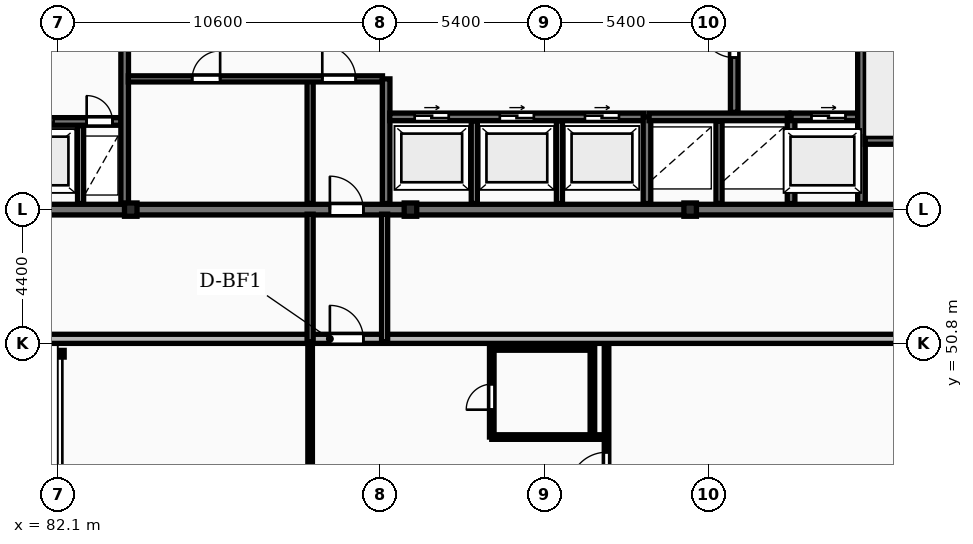
"""IFC4 building model, lengths in metres.
Left out: names, types, materials, properties, quantities, classifications, styles, units other than length and angle.
Written with IfcOpenShell. Run it as: python <this file> out.ifc"""

import sys

from ifc_helpers import new_model, si_unit, direction, frame, frame_2d, origin, origin_2d, place, context, subcontext, project, spatial, rectangle, i_section, extrude, element, fill, save


model = new_model("IFC4")
c1 = context("Model", 3, precision=1e-05, world=origin(), true_north=direction((0.0, 1.0)))
c2 = subcontext(c1, "Body", "Model", "MODEL_VIEW")
j1 = project(units=[si_unit("LENGTHUNIT", "METRE"), si_unit("PLANEANGLEUNIT", "RADIAN")], contexts=[c1])
p1 = place(None, origin())
s1 = spatial("IfcSite", under=j1, at=p1, CompositionType="ELEMENT")
p2 = place(p1, origin())
s2 = spatial("IfcBuilding", under=s1, at=p2, CompositionType="ELEMENT")
p3 = place(p2, frame((0.0, 0.0, 142.9)))
s3 = spatial("IfcBuildingStorey", under=s2, at=p3, CompositionType="ELEMENT", Elevation=142.9)
for number, where, z_axis, x_axis in (
    (1, (84.5, 55.2, 0.0), (0.0, 0.0, 1.0), (1.0, 0.0, 0.0)),
    (2, (93.7, 55.2, 0.0), (0.0, 0.0, 1.0), (1.0, 0.0, 0.0)),
    (3, (102.9, 55.2, 0.0), (0.0, 0.0, 1.0), (1.0, 0.0, 0.0)),
):
    element("IfcColumn", number, at=place(p3, frame(where, z_axis=z_axis, x_axis=x_axis)), inside=s3, PredefinedType="COLUMN", context=c2, shape_type="SweptSolid", body=[
        extrude(i_section(OverallWidth=0.412, OverallDepth=0.437, WebThickness=0.036, FlangeThickness=0.052, FilletRadius=0.015, at=origin_2d()), origin(), (0.0, 0.0, 1.0), 3.6),
    ])
p4 = place(p3, frame((57.6, 50.95, 0.0), z_axis=(0.0, 0.0, 1.0), x_axis=(1.0, 0.0, 0.0)))
e4 = element("IfcWall", 4, at=p4, inside=s3, PredefinedType="STANDARD", context=c2, shape_type="SweptSolid", body=[
    extrude(rectangle(XDim=73.0, YDim=0.3, at=frame_2d((36.5, 0.0))), origin(), (0.0, 0.0, 1.0), 3.31),
])
p5 = place(p4, frame((15.225, 0.0, 0.85)))
e5 = element("IfcOpeningElement", 5, at=p5, cuts=e4, PredefinedType="OPENING", context=c2, shape_type="SweptSolid", body=[
    extrude(rectangle(XDim=1.8, YDim=1.8, at=frame_2d((0.9, 0.9))), frame((0.0, 0.16, 0.0), z_axis=(0.0, -1.0, 0.0), x_axis=(1.0, 0.0, 0.0)), (0.0, 0.0, 1.0), 0.32),
])
p6 = place(p4, frame((58.575, 0.0, 0.85)))
e6 = element("IfcOpeningElement", 6, at=p6, cuts=e4, PredefinedType="OPENING", context=c2, shape_type="SweptSolid", body=[
    extrude(rectangle(XDim=1.8, YDim=1.8, at=frame_2d((0.9, 0.9))), frame((0.0, 0.16, 0.0), z_axis=(0.0, -1.0, 0.0), x_axis=(1.0, 0.0, 0.0)), (0.0, 0.0, 1.0), 0.32),
])
p7 = place(p4, frame((33.45, 0.0, 0.0)))
e7 = element("IfcOpeningElement", 7, at=p7, cuts=e4, PredefinedType="OPENING", context=c2, shape_type="SweptSolid", body=[
    extrude(rectangle(XDim=1.1, YDim=2.1, at=frame_2d((0.55, 1.05))), frame((0.0, 0.16, 0.0), z_axis=(0.0, -1.0, 0.0), x_axis=(1.0, 0.0, 0.0)), (0.0, 0.0, 1.0), 0.32),
])
p8 = place(p3, frame((75.95, 55.2, 0.0), z_axis=(0.0, 0.0, 1.0), x_axis=(1.0, 0.0, 0.0)))
e8 = element("IfcWall", 8, at=p8, inside=s3, PredefinedType="SHEAR", context=c2, shape_type="SweptSolid", body=[
    extrude(rectangle(XDim=36.3, YDim=0.35, at=frame_2d((18.15, 0.0))), origin(), (0.0, 0.0, 1.0), 3.6),
])
p9 = place(p8, frame((15.1, 0.0, 0.0)))
e9 = element("IfcOpeningElement", 9, at=p9, cuts=e8, PredefinedType="OPENING", context=c2, shape_type="SweptSolid", body=[
    extrude(rectangle(XDim=1.1, YDim=2.1, at=frame_2d((0.55, 1.05))), frame((0.0, 0.185, 0.0), z_axis=(0.0, -1.0, 0.0), x_axis=(1.0, 0.0, 0.0)), (0.0, 0.0, 1.0), 0.37),
])
p10 = place(p3, frame((79.79, 58.1, 0.0), z_axis=(0.0, 0.0, 1.0), x_axis=(1.0, 0.0, 0.0)))
e10 = element("IfcWall", 10, at=p10, inside=s3, PredefinedType="SHEAR", context=c2, shape_type="SweptSolid", body=[
    extrude(rectangle(XDim=4.39, YDim=0.25, at=frame_2d((2.195, 0.0))), origin(), (0.0, 0.0, 1.0), 3.6),
])
p11 = place(p10, frame((1.05, 0.0, 0.0)))
e11 = element("IfcOpeningElement", 11, at=p11, cuts=e10, PredefinedType="OPENING", context=c2, shape_type="SweptSolid", body=[
    extrude(rectangle(XDim=1.12, YDim=2.12, at=frame_2d((0.56, 1.06))), frame((0.0, 0.135, 0.0), z_axis=(0.0, -1.0, 0.0), x_axis=(1.0, 0.0, 0.0)), (0.0, 0.0, 1.0), 0.27),
])
p12 = place(p10, frame((3.26, 0.0, 0.0)))
e12 = element("IfcOpeningElement", 12, at=p12, cuts=e10, PredefinedType="OPENING", context=c2, shape_type="SweptSolid", body=[
    extrude(rectangle(XDim=0.85, YDim=2.05, at=frame_2d((0.425, 1.025))), frame((0.0, 0.135, 0.0), z_axis=(0.0, -1.0, 0.0), x_axis=(1.0, 0.0, 0.0)), (0.0, 0.0, 1.0), 0.27),
])
p13 = place(p3, frame((82.85, 55.4, 0.0), z_axis=(0.0, 0.0, 1.0), x_axis=(0.0, 1.0, 0.0)))
e13 = element("IfcWall", 13, at=p13, inside=s3, PredefinedType="PARTITIONING", context=c2, shape_type="SweptSolid", body=[
    extrude(rectangle(XDim=2.56, YDim=0.2, at=frame_2d((1.28, 0.0))), origin(), (0.0, 0.0, 1.0), 3.31),
])
p14 = place(p3, frame((84.3, 55.4, 0.0), z_axis=(0.0, 0.0, 1.0), x_axis=(0.0, 1.0, 0.0)))
e14 = element("IfcWall", 14, at=p14, inside=s3, PredefinedType="SHEAR", context=c2, shape_type="SweptSolid", body=[
    extrude(rectangle(XDim=11.6, YDim=0.25, at=frame_2d((5.8, 0.0))), origin(), (0.0, 0.0, 1.0), 3.6),
])
p15 = place(p14, frame((5.2, 0.0, 0.0)))
e15 = element("IfcOpeningElement", 15, at=p15, cuts=e14, PredefinedType="OPENING", context=c2, shape_type="SweptSolid", body=[
    extrude(rectangle(XDim=1.1, YDim=2.1, at=frame_2d((0.55, 1.05))), frame((0.0, 0.135, 0.0), z_axis=(0.0, -1.0, 0.0), x_axis=(1.0, 0.0, 0.0)), (0.0, 0.0, 1.0), 0.27),
])
p16 = place(p3, frame((90.4, 55.4, 0.0), z_axis=(0.0, 0.0, 1.0), x_axis=(0.0, 1.0, 0.0)))
e16 = element("IfcWall", 16, at=p16, inside=s3, PredefinedType="PARTITIONING", context=c2, shape_type="SweptSolid", body=[
    extrude(rectangle(XDim=4.1, YDim=0.2, at=frame_2d((2.05, 0.0))), origin(), (0.0, 0.0, 1.0), 3.31),
])
p17 = place(p3, frame((84.42, 59.5, 0.0), z_axis=(0.0, 0.0, 1.0), x_axis=(1.0, 0.0, 0.0)))
e17 = element("IfcWall", 17, at=p17, inside=s3, PredefinedType="PARTITIONING", context=c2, shape_type="SweptSolid", body=[
    extrude(rectangle(XDim=8.36, YDim=0.2, at=frame_2d((4.18, 0.0))), origin(), (0.0, 0.0, 1.0), 3.31),
])
p18 = place(p17, frame((2.1, 0.0, 0.0)))
e18 = element("IfcOpeningElement", 18, at=p18, cuts=e17, PredefinedType="OPENING", context=c2, shape_type="SweptSolid", body=[
    extrude(rectangle(XDim=0.92, YDim=2.08, at=frame_2d((0.46, 1.04))), frame((0.0, 0.11, 0.0), z_axis=(0.0, -1.0, 0.0), x_axis=(1.0, 0.0, 0.0)), (0.0, 0.0, 1.0), 0.22),
])
p19 = place(p17, frame((6.38, 0.0, 0.0)))
e19 = element("IfcOpeningElement", 19, at=p19, cuts=e17, PredefinedType="OPENING", context=c2, shape_type="SweptSolid", body=[
    extrude(rectangle(XDim=1.1, YDim=2.1, at=frame_2d((0.55, 1.05))), frame((0.0, 0.11, 0.0), z_axis=(0.0, -1.0, 0.0), x_axis=(1.0, 0.0, 0.0)), (0.0, 0.0, 1.0), 0.22),
])
p20 = place(p3, frame((92.9, 55.4, 0.0), z_axis=(0.0, 0.0, 1.0), x_axis=(0.0, 1.0, 0.0)))
e20 = element("IfcWall", 20, at=p20, inside=s3, PredefinedType="SHEAR", context=c2, shape_type="SweptSolid", body=[
    extrude(rectangle(XDim=4.1, YDim=0.25, at=frame_2d((2.05, 0.0))), origin(), (0.0, 0.0, 1.0), 3.6),
])
for number, where, z_axis, x_axis in (
    (21, (95.8, 55.4, 0.0), (0.0, 0.0, 1.0), (0.0, 1.0, 0.0)),
    (22, (98.6, 55.4, 0.0), (0.0, 0.0, 1.0), (0.0, 1.0, 0.0)),
):
    element("IfcWall", number, at=place(p3, frame(where, z_axis=z_axis, x_axis=x_axis)), inside=s3, PredefinedType="PARTITIONING", context=c2, shape_type="SweptSolid", body=[
        extrude(rectangle(XDim=2.72, YDim=0.2, at=frame_2d((1.36, 0.0))), origin(), (0.0, 0.0, 1.0), 3.31),
    ])
p21 = place(p3, frame((93.02, 58.25, 0.0), z_axis=(0.0, 0.0, 1.0), x_axis=(1.0, 0.0, 0.0)))
e23 = element("IfcWall", 23, at=p21, inside=s3, PredefinedType="SHEAR", context=c2, shape_type="SweptSolid", body=[
    extrude(rectangle(XDim=8.36, YDim=0.25, at=frame_2d((4.18, 0.0))), origin(), (0.0, 0.0, 1.0), 3.6),
])
p22 = place(p21, frame((0.82, 0.0, 0.0)))
e24 = element("IfcOpeningElement", 24, at=p22, cuts=e23, PredefinedType="OPENING", context=c2, shape_type="SweptSolid", body=[
    extrude(rectangle(XDim=1.12, YDim=2.12, at=frame_2d((0.56, 1.06))), frame((0.0, 0.135, 0.0), z_axis=(0.0, -1.0, 0.0), x_axis=(1.0, 0.0, 0.0)), (0.0, 0.0, 1.0), 0.27),
])
p23 = place(p21, frame((3.62, 0.0, 0.0)))
e25 = element("IfcOpeningElement", 25, at=p23, cuts=e23, PredefinedType="OPENING", context=c2, shape_type="SweptSolid", body=[
    extrude(rectangle(XDim=1.12, YDim=2.12, at=frame_2d((0.56, 1.06))), frame((0.0, 0.135, 0.0), z_axis=(0.0, -1.0, 0.0), x_axis=(1.0, 0.0, 0.0)), (0.0, 0.0, 1.0), 0.27),
])
p24 = place(p21, frame((6.42, 0.0, 0.0)))
e26 = element("IfcOpeningElement", 26, at=p24, cuts=e23, PredefinedType="OPENING", context=c2, shape_type="SweptSolid", body=[
    extrude(rectangle(XDim=1.12, YDim=2.12, at=frame_2d((0.56, 1.06))), frame((0.0, 0.135, 0.0), z_axis=(0.0, -1.0, 0.0), x_axis=(1.0, 0.0, 0.0)), (0.0, 0.0, 1.0), 0.27),
])
p25 = place(p3, frame((101.48, 55.4, 0.0), z_axis=(0.0, 0.0, 1.0), x_axis=(0.0, 1.0, 0.0)))
e27 = element("IfcWall", 27, at=p25, inside=s3, PredefinedType="SHEAR", context=c2, shape_type="SweptSolid", body=[
    extrude(rectangle(XDim=2.85, YDim=0.25, at=frame_2d((1.425, 0.0))), origin(), (0.0, 0.0, 1.0), 3.6),
])
p26 = place(p3, frame((103.85, 55.4, 0.0), z_axis=(0.0, 0.0, 1.0), x_axis=(0.0, 1.0, 0.0)))
e28 = element("IfcWall", 28, at=p26, inside=s3, PredefinedType="PARTITIONING", context=c2, shape_type="SweptSolid", body=[
    extrude(rectangle(XDim=2.72, YDim=0.2, at=frame_2d((1.36, 0.0))), origin(), (0.0, 0.0, 1.0), 3.31),
])
p27 = place(p3, frame((101.55, 58.25, 0.0), z_axis=(0.0, 0.0, 1.0), x_axis=(1.0, 0.0, 0.0)))
e29 = element("IfcWall", 29, at=p27, inside=s3, PredefinedType="SHEAR", context=c2, shape_type="SweptSolid", body=[
    extrude(rectangle(XDim=4.6, YDim=0.25, at=frame_2d((2.3, 0.0))), origin(), (0.0, 0.0, 1.0), 3.6),
])
p28 = place(p3, frame((106.22, 55.4, 0.0), z_axis=(0.0, 0.0, 1.0), x_axis=(0.0, 1.0, 0.0)))
e30 = element("IfcWall", 30, at=p28, inside=s3, PredefinedType="SHEAR", context=c2, shape_type="SweptSolid", body=[
    extrude(rectangle(XDim=2.85, YDim=0.25, at=frame_2d((1.425, 0.0))), origin(), (0.0, 0.0, 1.0), 3.6),
])
p29 = place(p3, frame((106.22, 58.25, 0.0), z_axis=(0.0, 0.0, 1.0), x_axis=(1.0, 0.0, 0.0)))
e31 = element("IfcWall", 31, at=p29, inside=s3, PredefinedType="SHEAR", context=c2, shape_type="SweptSolid", body=[
    extrude(rectangle(XDim=2.46, YDim=0.25, at=frame_2d((1.23, 0.0))), origin(), (0.0, 0.0, 1.0), 3.6),
])
p30 = place(p29, frame((0.67, 0.0, 0.0)))
e32 = element("IfcOpeningElement", 32, at=p30, cuts=e31, PredefinedType="OPENING", context=c2, shape_type="SweptSolid", body=[
    extrude(rectangle(XDim=1.12, YDim=2.12, at=frame_2d((0.56, 1.06))), frame((0.0, 0.135, 0.0), z_axis=(0.0, -1.0, 0.0), x_axis=(1.0, 0.0, 0.0)), (0.0, 0.0, 1.0), 0.27),
])
p31 = place(p3, frame((104.35, 58.4, 0.0), z_axis=(0.0, 0.0, 1.0), x_axis=(0.0, 1.0, 0.0)))
e33 = element("IfcWall", 33, at=p31, inside=s3, PredefinedType="SHEAR", context=c2, shape_type="SweptSolid", body=[
    extrude(rectangle(XDim=8.6, YDim=0.25, at=frame_2d((4.3, 0.0))), origin(), (0.0, 0.0, 1.0), 3.6),
])
p32 = place(p31, frame((1.8, 0.0, 0.0)))
e34 = element("IfcOpeningElement", 34, at=p32, cuts=e33, PredefinedType="OPENING", context=c2, shape_type="SweptSolid", body=[
    extrude(rectangle(XDim=1.1, YDim=2.1, at=frame_2d((0.55, 1.05))), frame((0.0, 0.135, 0.0), z_axis=(0.0, -1.0, 0.0), x_axis=(1.0, 0.0, 0.0)), (0.0, 0.0, 1.0), 0.27),
])
p33 = place(p3, frame((108.535, 55.4, 0.0), z_axis=(0.0, 0.0, 1.0), x_axis=(0.0, 1.0, 0.0)))
e35 = element("IfcWall", 35, at=p33, inside=s3, PredefinedType="SHEAR", context=c2, shape_type="SweptSolid", body=[
    extrude(rectangle(XDim=11.6, YDim=0.25, at=frame_2d((5.8, 0.0))), origin(), (0.0, 0.0, 1.0), 3.6),
])
p34 = place(p33, frame((8.2, 0.0, 0.0)))
e36 = element("IfcOpeningElement", 36, at=p34, cuts=e35, PredefinedType="OPENING", context=c2, shape_type="SweptSolid", body=[
    extrude(rectangle(XDim=1.1, YDim=2.1, at=frame_2d((0.55, 1.05))), frame((0.0, 0.135, 0.0), z_axis=(0.0, -1.0, 0.0), x_axis=(1.0, 0.0, 0.0)), (0.0, 0.0, 1.0), 0.27),
])
p35 = place(p33, frame((10.25, 0.0, 0.0)))
e37 = element("IfcOpeningElement", 37, at=p35, cuts=e35, PredefinedType="OPENING", context=c2, shape_type="SweptSolid", body=[
    extrude(rectangle(XDim=0.85, YDim=2.05, at=frame_2d((0.425, 1.025))), frame((0.0, 0.135, 0.0), z_axis=(0.0, -1.0, 0.0), x_axis=(1.0, 0.0, 0.0)), (0.0, 0.0, 1.0), 0.27),
])
p36 = place(p3, frame((108.66, 57.475, 0.0), z_axis=(0.0, 0.0, 1.0), x_axis=(1.0, 0.0, 0.0)))
e38 = element("IfcWall", 38, at=p36, inside=s3, PredefinedType="SHEAR", context=c2, shape_type="SweptSolid", body=[
    extrude(rectangle(XDim=3.24, YDim=0.25, at=frame_2d((1.62, 0.0))), origin(), (0.0, 0.0, 1.0), 3.6),
])
for number, where, z_axis, x_axis in (
    (39, (90.4, 50.85, 0.0), (0.0, 0.0, 1.0), (0.0, 1.0, 0.0)),
    (40, (92.85, 50.85, 0.0), (0.0, 0.0, 1.0), (0.0, 1.0, 0.0)),
):
    element("IfcWall", number, at=place(p3, frame(where, z_axis=z_axis, x_axis=x_axis)), inside=s3, PredefinedType="PARTITIONING", context=c2, shape_type="SweptSolid", body=[
        extrude(rectangle(XDim=4.2, YDim=0.2, at=frame_2d((2.1, 0.0))), origin(), (0.0, 0.0, 1.0), 3.31),
    ])
p37 = place(p3, frame((96.375, 50.65, 0.0), z_axis=(0.0, 0.0, 1.0), x_axis=(1.0, 0.0, 0.0)))
e41 = element("IfcWall", 41, at=p37, inside=s3, PredefinedType="PARTITIONING", context=c2, shape_type="SweptSolid", body=[
    extrude(rectangle(XDim=3.31, YDim=0.15, at=frame_2d((1.655, 0.0))), origin(), (0.0, 0.0, 1.0), 2.69),
])
p38 = place(p3, frame((96.375, 47.72, 0.0), z_axis=(0.0, 0.0, 1.0), x_axis=(0.0, 1.0, 0.0)))
e42 = element("IfcWall", 42, at=p38, inside=s3, PredefinedType="PARTITIONING", context=c2, shape_type="SweptSolid", body=[
    extrude(rectangle(XDim=2.93, YDim=0.15, at=frame_2d((1.465, 0.0))), origin(), (0.0, 0.0, 1.0), 2.384),
])
p39 = place(p38, frame((0.9, 0.0, 0.0)))
e43 = element("IfcOpeningElement", 43, at=p39, cuts=e42, PredefinedType="OPENING", context=c2, shape_type="SweptSolid", body=[
    extrude(rectangle(XDim=0.84, YDim=2.04, at=frame_2d((0.42, 1.02))), frame((0.0, 0.085, 0.0), z_axis=(0.0, -1.0, 0.0), x_axis=(1.0, 0.0, 0.0)), (0.0, 0.0, 1.0), 0.17),
])
p40 = place(p3, frame((96.375, 47.72, 0.0), z_axis=(0.0, 0.0, 1.0), x_axis=(1.0, 0.0, 0.0)))
e44 = element("IfcWall", 44, at=p40, inside=s3, PredefinedType="PARTITIONING", context=c2, shape_type="SweptSolid", body=[
    extrude(rectangle(XDim=3.775, YDim=0.15, at=frame_2d((1.887, 0.0))), origin(), (0.0, 0.0, 1.0), 3.31),
])
p41 = place(p3, frame((99.685, 47.72, 0.0), z_axis=(0.0, 0.0, 1.0), x_axis=(0.0, 1.0, 0.0)))
e45 = element("IfcWall", 45, at=p41, inside=s3, PredefinedType="PARTITIONING", context=c2, shape_type="SweptSolid", body=[
    extrude(rectangle(XDim=2.93, YDim=0.15, at=frame_2d((1.465, 0.0))), origin(), (0.0, 0.0, 1.0), 2.384),
])
p42 = place(p3, frame((90.4, 32.9, 0.0), z_axis=(0.0, 0.0, 1.0), x_axis=(0.0, 1.0, 0.0)))
e46 = element("IfcWall", 46, at=p42, inside=s3, PredefinedType="PARTITIONING", context=c2, shape_type="SweptSolid", body=[
    extrude(rectangle(XDim=17.8, YDim=0.15, at=frame_2d((8.9, 0.0))), origin(), (0.0, 0.0, 1.0), 3.31),
])
p43 = place(p42, frame((8.2, 0.0, 0.0)))
e47 = element("IfcOpeningElement", 47, at=p43, cuts=e46, PredefinedType="OPENING", context=c2, shape_type="SweptSolid", body=[
    extrude(rectangle(XDim=1.22, YDim=2.18, at=frame_2d((0.61, 1.09))), frame((0.0, 0.085, 0.0), z_axis=(0.0, -1.0, 0.0), x_axis=(1.0, 0.0, 0.0)), (0.0, 0.0, 1.0), 0.17),
])
p44 = place(p3, frame((100.15, 32.9, 0.0), z_axis=(0.0, 0.0, 1.0), x_axis=(0.0, 1.0, 0.0)))
e48 = element("IfcWall", 48, at=p44, inside=s3, PredefinedType="PARTITIONING", context=c2, shape_type="SweptSolid", body=[
    extrude(rectangle(XDim=17.8, YDim=0.15, at=frame_2d((8.9, 0.0))), origin(), (0.0, 0.0, 1.0), 3.31),
])
p45 = place(p44, frame((13.1, 0.0, 0.0)))
e49 = element("IfcOpeningElement", 49, at=p45, cuts=e48, PredefinedType="OPENING", context=c2, shape_type="SweptSolid", body=[
    extrude(rectangle(XDim=1.22, YDim=2.18, at=frame_2d((0.61, 1.09))), frame((0.0, 0.085, 0.0), z_axis=(0.0, -1.0, 0.0), x_axis=(1.0, 0.0, 0.0)), (0.0, 0.0, 1.0), 0.17),
])
p46 = place(p7, origin())
e50 = element("IfcDoor", 50, at=p46, inside=s3, OperationType="SINGLE_SWING_LEFT", PredefinedType="DOOR", context=c2, shape_type="SweptSolid", body=[
    extrude(rectangle(XDim=1.1, YDim=2.1, at=frame_2d((0.55, 1.05))), frame((0.0, 0.025, 0.0), z_axis=(0.0, -1.0, 0.0), x_axis=(1.0, 0.0, 0.0)), (0.0, 0.0, 1.0), 0.05),
])
fill(e7, e50)
p47 = place(p9, origin())
e51 = element("IfcDoor", 51, at=p47, inside=s3, OperationType="SINGLE_SWING_LEFT", PredefinedType="DOOR", context=c2, shape_type="SweptSolid", body=[
    extrude(rectangle(XDim=1.1, YDim=2.1, at=frame_2d((0.55, 1.05))), frame((0.0, 0.025, 0.0), z_axis=(0.0, -1.0, 0.0), x_axis=(1.0, 0.0, 0.0)), (0.0, 0.0, 1.0), 0.05),
])
fill(e9, e51)
p48 = place(p11, origin())
e52 = element("IfcDoor", 52, at=p48, inside=s3, OperationType="SLIDING_TO_LEFT", PredefinedType="DOOR", context=c2, shape_type="SweptSolid", body=[
    extrude(rectangle(XDim=1.12, YDim=2.12, at=frame_2d((0.56, 1.06))), frame((0.0, 0.025, 0.0), z_axis=(0.0, -1.0, 0.0), x_axis=(1.0, 0.0, 0.0)), (0.0, 0.0, 1.0), 0.05),
])
fill(e11, e52)
p49 = place(p12, origin())
e53 = element("IfcDoor", 53, at=p49, inside=s3, OperationType="SINGLE_SWING_LEFT", PredefinedType="DOOR", context=c2, shape_type="SweptSolid", body=[
    extrude(rectangle(XDim=0.85, YDim=2.05, at=frame_2d((0.425, 1.025))), frame((0.0, 0.025, 0.0), z_axis=(0.0, -1.0, 0.0), x_axis=(1.0, 0.0, 0.0)), (0.0, 0.0, 1.0), 0.05),
])
fill(e12, e53)
p50 = place(p18, origin())
e54 = element("IfcDoor", 54, at=p50, inside=s3, OperationType="SINGLE_SWING_RIGHT", PredefinedType="DOOR", context=c2, shape_type="SweptSolid", body=[
    extrude(rectangle(XDim=0.92, YDim=2.08, at=frame_2d((0.46, 1.04))), frame((0.0, 0.025, 0.0), z_axis=(0.0, -1.0, 0.0), x_axis=(1.0, 0.0, 0.0)), (0.0, 0.0, 1.0), 0.05),
])
fill(e18, e54)
p51 = place(p19, origin())
e55 = element("IfcDoor", 55, at=p51, inside=s3, OperationType="SINGLE_SWING_LEFT", PredefinedType="DOOR", context=c2, shape_type="SweptSolid", body=[
    extrude(rectangle(XDim=1.1, YDim=2.1, at=frame_2d((0.55, 1.05))), frame((0.0, 0.025, 0.0), z_axis=(0.0, -1.0, 0.0), x_axis=(1.0, 0.0, 0.0)), (0.0, 0.0, 1.0), 0.05),
])
fill(e19, e55)
p52 = place(p22, origin())
e56 = element("IfcDoor", 56, at=p52, inside=s3, OperationType="SLIDING_TO_RIGHT", PredefinedType="DOOR", context=c2, shape_type="SweptSolid", body=[
    extrude(rectangle(XDim=1.12, YDim=2.12, at=frame_2d((0.56, 1.06))), frame((0.0, 0.025, 0.0), z_axis=(0.0, -1.0, 0.0), x_axis=(1.0, 0.0, 0.0)), (0.0, 0.0, 1.0), 0.05),
])
fill(e24, e56)
p53 = place(p23, origin())
e57 = element("IfcDoor", 57, at=p53, inside=s3, OperationType="SLIDING_TO_RIGHT", PredefinedType="DOOR", context=c2, shape_type="SweptSolid", body=[
    extrude(rectangle(XDim=1.12, YDim=2.12, at=frame_2d((0.56, 1.06))), frame((0.0, 0.025, 0.0), z_axis=(0.0, -1.0, 0.0), x_axis=(1.0, 0.0, 0.0)), (0.0, 0.0, 1.0), 0.05),
])
fill(e25, e57)
p54 = place(p24, origin())
e58 = element("IfcDoor", 58, at=p54, inside=s3, OperationType="SLIDING_TO_RIGHT", PredefinedType="DOOR", context=c2, shape_type="SweptSolid", body=[
    extrude(rectangle(XDim=1.12, YDim=2.12, at=frame_2d((0.56, 1.06))), frame((0.0, 0.025, 0.0), z_axis=(0.0, -1.0, 0.0), x_axis=(1.0, 0.0, 0.0)), (0.0, 0.0, 1.0), 0.05),
])
fill(e26, e58)
p55 = place(p30, origin())
e59 = element("IfcDoor", 59, at=p55, inside=s3, OperationType="SLIDING_TO_RIGHT", PredefinedType="DOOR", context=c2, shape_type="SweptSolid", body=[
    extrude(rectangle(XDim=1.12, YDim=2.12, at=frame_2d((0.56, 1.06))), frame((0.0, 0.025, 0.0), z_axis=(0.0, -1.0, 0.0), x_axis=(1.0, 0.0, 0.0)), (0.0, 0.0, 1.0), 0.05),
])
fill(e32, e59)
p56 = place(p32, origin())
e60 = element("IfcDoor", 60, at=p56, inside=s3, OperationType="SINGLE_SWING_RIGHT", PredefinedType="DOOR", context=c2, shape_type="SweptSolid", body=[
    extrude(rectangle(XDim=1.1, YDim=2.1, at=frame_2d((0.55, 1.05))), frame((0.0, 0.025, 0.0), z_axis=(0.0, -1.0, 0.0), x_axis=(1.0, 0.0, 0.0)), (0.0, 0.0, 1.0), 0.05),
])
fill(e34, e60)
p57 = place(p39, origin())
e61 = element("IfcDoor", 61, at=p57, inside=s3, OperationType="SINGLE_SWING_LEFT", PredefinedType="DOOR", context=c2, shape_type="SweptSolid", body=[
    extrude(rectangle(XDim=0.84, YDim=2.04, at=frame_2d((0.42, 1.02))), frame((0.0, 0.025, 0.0), z_axis=(0.0, -1.0, 0.0), x_axis=(1.0, 0.0, 0.0)), (0.0, 0.0, 1.0), 0.05),
])
fill(e43, e61)
p58 = place(p45, origin())
e62 = element("IfcDoor", 62, at=p58, inside=s3, OperationType="SINGLE_SWING_LEFT", PredefinedType="DOOR", context=c2, shape_type="SweptSolid", body=[
    extrude(rectangle(XDim=1.22, YDim=2.18, at=frame_2d((0.61, 1.09))), frame((0.0, 0.025, 0.0), z_axis=(0.0, -1.0, 0.0), x_axis=(1.0, 0.0, 0.0)), (0.0, 0.0, 1.0), 0.05),
])
fill(e49, e62)
save(model, sys.argv[1])
